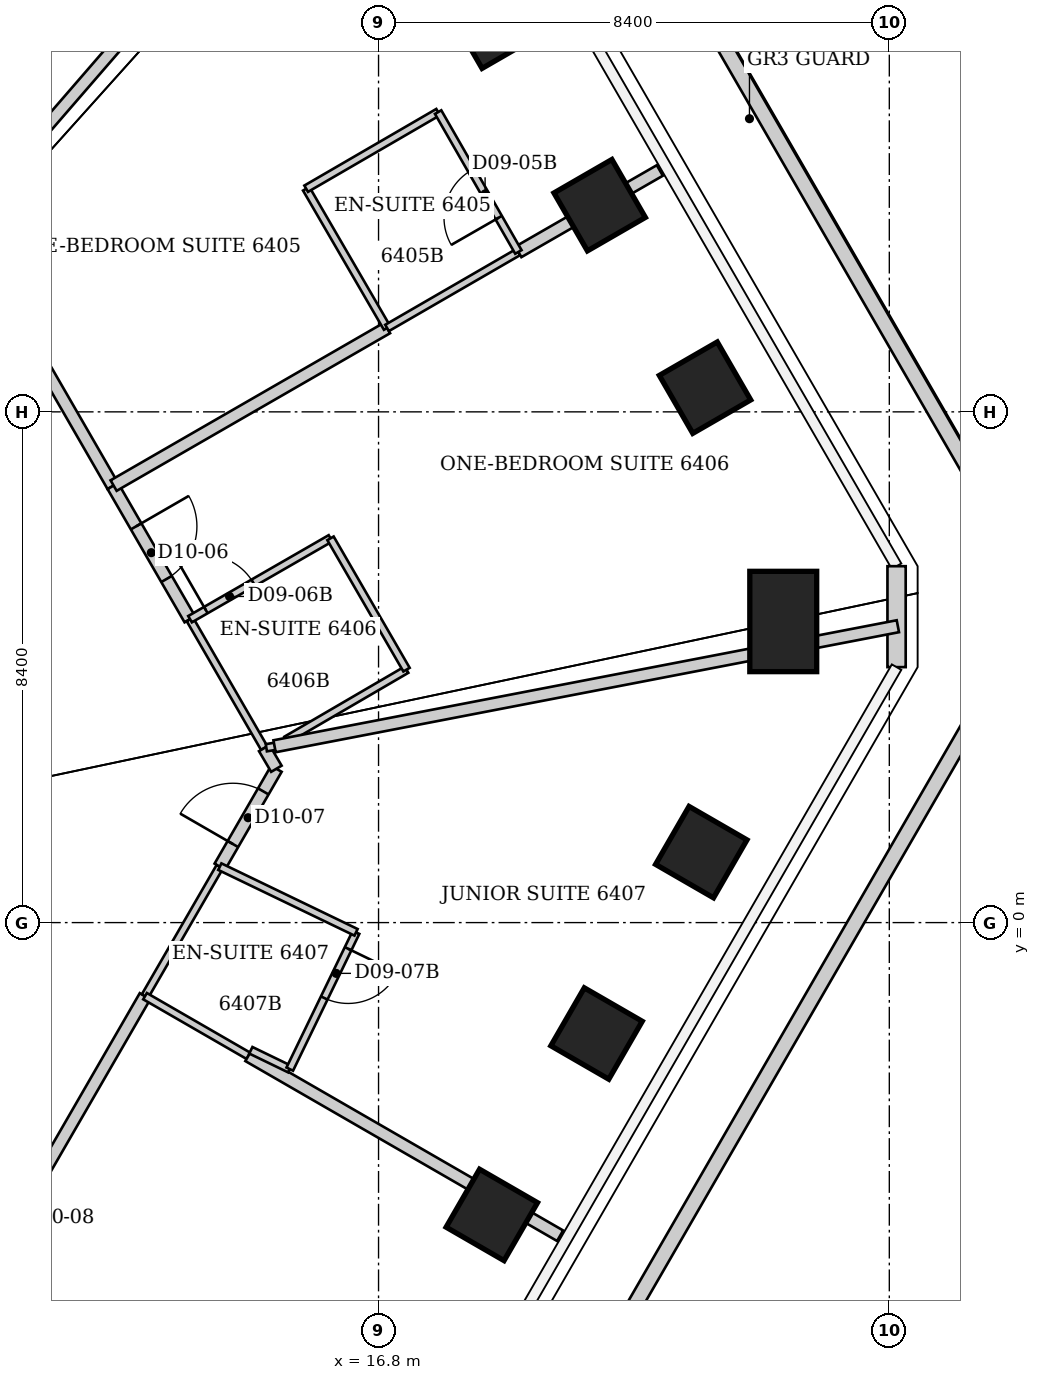
"""IFC4 building model, lengths in metres.
Left out: names, types, materials, properties, quantities, classifications, styles, units other than length and angle.
Written with IfcOpenShell. Run it as: python <this file> out.ifc"""

import sys

from ifc_helpers import new_model, si_unit, direction, frame, frame_2d, origin, origin_2d, place, context, subcontext, project, spatial, rectangle, extrude, clip, halfspace, element, fill, save


model = new_model("IFC4")
c1 = context("Model", 3, precision=1e-05, world=origin(), true_north=direction((0.0, 1.0)))
c2 = subcontext(c1, "Body", "Model", "MODEL_VIEW")
j1 = project(units=[si_unit("LENGTHUNIT", "METRE"), si_unit("PLANEANGLEUNIT", "RADIAN")], contexts=[c1])
p1 = place(None, origin())
s1 = spatial("IfcSite", under=j1, at=p1, CompositionType="ELEMENT")
p2 = place(p1, origin())
s2 = spatial("IfcBuilding", under=s1, at=p2, CompositionType="ELEMENT")
p3 = place(p2, frame((0.0, 0.0, 257.0)))
s3 = spatial("IfcBuildingStorey", under=s2, at=p3, CompositionType="ELEMENT", Elevation=257.0)
p4 = place(p3, frame((18.704, 14.8, -0.059), z_axis=(0.0, 0.0, 1.0), x_axis=(0.866025403784, 0.5, 0.0)))
e1 = element("IfcColumn", 1, at=p4, inside=s3, PredefinedType="COLUMN", context=c2, shape_type="SweptSolid", body=[
    clip(extrude(rectangle(XDim=1.1, YDim=1.1, at=origin_2d()), origin(), (0.0, 0.0, 1.0), 3.859), halfspace(frame((0.0, 0.0, 0.059)), True)),
])
p5 = place(p3, frame((20.437, 11.799, -0.051), z_axis=(0.0, 0.0, 1.0), x_axis=(0.866025403784, 0.5, 0.0)))
e2 = element("IfcColumn", 2, at=p5, inside=s3, PredefinedType="COLUMN", context=c2, shape_type="SweptSolid", body=[
    clip(extrude(rectangle(XDim=1.1, YDim=1.1, at=origin_2d()), origin(), (0.0, 0.0, 1.0), 3.851), halfspace(frame((0.0, 0.0, 0.051)), True)),
])
p6 = place(p3, frame((22.169, 8.798, -0.059), z_axis=(0.0, 0.0, 1.0), x_axis=(0.866025403784, 0.5, 0.0)))
e3 = element("IfcColumn", 3, at=p6, inside=s3, PredefinedType="COLUMN", context=c2, shape_type="SweptSolid", body=[
    clip(extrude(rectangle(XDim=1.1, YDim=1.1, at=origin_2d()), origin(), (0.0, 0.0, 1.0), 3.859), halfspace(frame((0.0, 0.0, 0.059)), True)),
])
p7 = place(p3, frame((23.456, 4.952, -0.069), z_axis=(0.0, 0.0, 1.0), x_axis=(1.0, 0.0, 0.0)))
e4 = element("IfcColumn", 4, at=p7, inside=s3, PredefinedType="COLUMN", context=c2, shape_type="SweptSolid", body=[
    clip(extrude(rectangle(XDim=1.1, YDim=1.65, at=origin_2d()), origin(), (0.0, 0.0, 1.0), 3.869), halfspace(frame((0.0, 0.0, 0.069)), True)),
])
p8 = place(p3, frame((22.108, 1.159, -0.067), z_axis=(0.0, 0.0, 1.0), x_axis=(0.866025403784, -0.5, 0.0)))
e5 = element("IfcColumn", 5, at=p8, inside=s3, PredefinedType="COLUMN", context=c2, shape_type="SweptSolid", body=[
    clip(extrude(rectangle(XDim=1.1, YDim=1.1, at=origin_2d()), origin(), (0.0, 0.0, 1.0), 3.867), halfspace(frame((0.0, 0.0, 0.067)), True)),
])
p9 = place(p3, frame((20.385, -1.824, -0.06), z_axis=(0.0, 0.0, 1.0), x_axis=(0.866025403784, -0.5, 0.0)))
e6 = element("IfcColumn", 6, at=p9, inside=s3, PredefinedType="COLUMN", context=c2, shape_type="SweptSolid", body=[
    clip(extrude(rectangle(XDim=1.1, YDim=1.1, at=origin_2d()), origin(), (0.0, 0.0, 1.0), 3.86), halfspace(frame((0.0, 0.0, 0.06)), True)),
])
p10 = place(p3, frame((18.663, -4.808, -0.052), z_axis=(0.0, 0.0, 1.0), x_axis=(0.866025403784, -0.5, 0.0)))
e7 = element("IfcColumn", 7, at=p10, inside=s3, PredefinedType="COLUMN", context=c2, shape_type="SweptSolid", body=[
    clip(extrude(rectangle(XDim=1.1, YDim=1.1, at=origin_2d()), origin(), (0.0, 0.0, 1.0), 3.852), halfspace(frame((0.0, 0.0, 0.052)), True)),
])
p11 = place(p3, frame((25.319, 5.862, 0.0), z_axis=(0.0, 0.0, 1.0), x_axis=(0.0, -1.0, 0.0)))
e8 = element("IfcWall", 8, at=p11, inside=s3, PredefinedType="SOLIDWALL", context=c2, shape_type="SweptSolid", body=[
    extrude(rectangle(XDim=1.66, YDim=0.3, at=frame_2d((0.83, 0.0))), origin(), (0.0, 0.0, 1.0), 3.64),
])
p12 = place(p3, frame((9.75, -25.8, 0.0), z_axis=(0.0, 0.0, 1.0), x_axis=(0.499998496786, 0.866026271663, 0.0)))
e9 = element("IfcWall", 9, at=p12, inside=s3, PredefinedType="PARAPET", context=c2, shape_type="SweptSolid", body=[
    extrude(rectangle(XDim=34.936, YDim=0.25, at=frame_2d((17.468, 0.0))), origin(), (0.0, 0.0, 1.0), 1.1),
])
p13 = place(p3, frame((27.22, 6.217, 0.0), z_axis=(0.0, 0.0, 1.0), x_axis=(-0.49999647861, 0.86602743685, 0.0)))
e10 = element("IfcWall", 10, at=p13, inside=s3, PredefinedType="PARAPET", context=c2, shape_type="SweptSolid", body=[
    extrude(rectangle(XDim=16.453, YDim=0.25, at=frame_2d((8.226, 0.0))), origin(), (0.0, 0.0, 1.0), 1.1),
])
p14 = place(p3, frame((8.75, -8.5, 0.0), z_axis=(0.0, 0.0, 1.0), x_axis=(0.500093981358, 0.865971136822, 0.0)))
e11 = element("IfcWall", 11, at=p14, inside=s3, PredefinedType="PARTITIONING", context=c2, shape_type="SweptSolid", body=[
    extrude(rectangle(XDim=8.418, YDim=0.2, at=frame_2d((4.209, 0.0))), origin(), (0.0, 0.0, 1.0), 3.64),
])
p15 = place(p14, frame((3.709, 0.0, 0.0)))
e12 = element("IfcOpeningElement", 12, at=p15, cuts=e11, PredefinedType="OPENING", context=c2, shape_type="SweptSolid", body=[
    extrude(rectangle(XDim=1.0, YDim=2.13, at=frame_2d((0.5, 1.065))), frame((0.0, 0.1, 0.0), z_axis=(0.0, -1.0, 0.0), x_axis=(1.0, 0.0, 0.0)), (0.0, 0.0, 1.0), 0.2),
])
p16 = place(p3, frame((11.19, 9.33, 0.0), z_axis=(0.0, 0.0, 1.0), x_axis=(0.499577688184, -0.866269088372, 0.0)))
e13 = element("IfcWall", 13, at=p16, inside=s3, PredefinedType="PARTITIONING", context=c2, shape_type="SweptSolid", body=[
    extrude(rectangle(XDim=2.482, YDim=0.2, at=frame_2d((1.241, 0.0))), origin(), (0.0, 0.0, 1.0), 3.64),
])
p17 = place(p3, frame((12.43, 7.18, 0.0), z_axis=(0.0, 0.0, 1.0), x_axis=(0.500329012441, -0.865835365015, 0.0)))
e14 = element("IfcWall", 14, at=p17, inside=s3, PredefinedType="PARTITIONING", context=c2, shape_type="SweptSolid", body=[
    extrude(rectangle(XDim=2.531, YDim=0.2, at=frame_2d((1.266, 0.0))), origin(), (0.0, 0.0, 1.0), 3.64),
])
p18 = place(p17, frame((0.766, 0.0, 0.0)))
e15 = element("IfcOpeningElement", 15, at=p18, cuts=e14, PredefinedType="OPENING", context=c2, shape_type="SweptSolid", body=[
    extrude(rectangle(XDim=1.0, YDim=2.13, at=frame_2d((0.5, 1.065))), frame((0.0, 0.1, 0.0), z_axis=(0.0, -1.0, 0.0), x_axis=(1.0, 0.0, 0.0)), (0.0, 0.0, 1.0), 0.2),
])
p19 = place(p3, frame((12.443, 7.188, 0.0), z_axis=(0.0, 0.0, 1.0), x_axis=(0.866335108717, 0.499463191241, 0.0)))
e16 = element("IfcWall", 16, at=p19, inside=s3, PredefinedType="PARTITIONING", context=c2, shape_type="SweptSolid", body=[
    extrude(rectangle(XDim=5.191, YDim=0.2, at=frame_2d((2.595, 0.0))), origin(), (0.0, 0.0, 1.0), 2.878),
])
p20 = place(p3, frame((12.959, -1.209, 0.0), z_axis=(0.0, 0.0, 1.0), x_axis=(0.500472725713, 0.865752303385, 0.0)))
e17 = element("IfcWall", 17, at=p20, inside=s3, PredefinedType="PARTITIONING", context=c2, shape_type="SweptSolid", body=[
    extrude(rectangle(XDim=2.459, YDim=0.12, at=frame_2d((1.23, 0.0))), origin(), (0.0, 0.0, 1.0), 3.64),
])
p21 = place(p3, frame((12.96, -1.21, 0.0), z_axis=(0.0, 0.0, 1.0), x_axis=(0.866075784294, -0.499912728242, 0.0)))
e18 = element("IfcWall", 18, at=p21, inside=s3, PredefinedType="PARTITIONING", context=c2, shape_type="SweptSolid", body=[
    extrude(rectangle(XDim=1.962, YDim=0.12, at=frame_2d((0.981, 0.0))), origin(), (0.0, 0.0, 1.0), 3.64),
])
p22 = place(p3, frame((13.697, 4.988, 0.0), z_axis=(0.0, 0.0, 1.0), x_axis=(0.500142899558, -0.865942884965, 0.0)))
e19 = element("IfcWall", 19, at=p22, inside=s3, PredefinedType="PARTITIONING", context=c2, shape_type="SweptSolid", body=[
    extrude(rectangle(XDim=2.446, YDim=0.12, at=frame_2d((1.223, 0.0))), origin(), (0.0, 0.0, 1.0), 3.64),
])
p23 = place(p3, frame((14.19, 0.92, 0.0), z_axis=(0.0, 0.0, 1.0), x_axis=(0.500233848448, 0.865890349217, 0.0)))
e20 = element("IfcWall", 20, at=p23, inside=s3, PredefinedType="PARTITIONING", context=c2, shape_type="SweptSolid", body=[
    extrude(rectangle(XDim=1.859, YDim=0.2, at=frame_2d((0.93, 0.0))), origin(), (0.0, 0.0, 1.0), 3.64),
])
p24 = place(p23, frame((0.43, 0.0, 0.0)))
e21 = element("IfcOpeningElement", 21, at=p24, cuts=e20, PredefinedType="OPENING", context=c2, shape_type="SweptSolid", body=[
    extrude(rectangle(XDim=1.0, YDim=2.13, at=frame_2d((0.5, 1.065))), frame((0.0, 0.1, 0.0), z_axis=(0.0, -1.0, 0.0), x_axis=(1.0, 0.0, 0.0)), (0.0, 0.0, 1.0), 0.2),
])
p25 = place(p3, frame((14.659, -2.191, 0.0), z_axis=(0.0, 0.0, 1.0), x_axis=(0.866075017274, -0.499914057068, 0.0)))
e22 = element("IfcWall", 22, at=p25, inside=s3, PredefinedType="PARTITIONING", context=c2, shape_type="SweptSolid", body=[
    extrude(rectangle(XDim=5.919, YDim=0.2, at=frame_2d((2.96, 0.0))), origin(), (0.0, 0.0, 1.0), 3.64),
])
p26 = place(p3, frame((14.7, -2.1, 0.0), z_axis=(0.0, 0.0, 1.0), x_axis=(0.900120171182, -0.43564168468, 0.0)))
e23 = element("IfcWall", 23, at=p26, inside=s3, PredefinedType="PARTITIONING", context=c2, shape_type="SweptSolid", body=[
    extrude(rectangle(XDim=0.711, YDim=0.12, at=frame_2d((0.355, 0.0))), origin(), (0.0, 0.0, 1.0), 3.64),
])
p27 = place(p3, frame((14.92, 2.87, 0.0), z_axis=(0.0, 0.0, 1.0), x_axis=(0.507290461451, -0.861775137562, 0.0)))
e24 = element("IfcWall", 24, at=p27, inside=s3, PredefinedType="PARTITIONING", context=c2, shape_type="SweptSolid", body=[
    extrude(rectangle(XDim=0.395, YDim=0.2, at=frame_2d((0.197, 0.0))), origin(), (0.0, 0.0, 1.0), 3.64),
])
p28 = place(p3, frame((14.955, 2.876, 0.0), z_axis=(0.0, 0.0, 1.0), x_axis=(0.986483246584, 0.16386215002, 0.0)))
e25 = element("IfcWall", 25, at=p28, inside=s3, PredefinedType="PARTITIONING", context=c2, shape_type="SweptSolid", body=[
    extrude(rectangle(XDim=0.147, YDim=0.12, at=frame_2d((0.074, 0.0))), origin(), (0.0, 0.0, 1.0), 3.64),
])
p29 = place(p3, frame((15.281, 3.006, 0.0), z_axis=(0.0, 0.0, 1.0), x_axis=(0.863794364129, 0.503844516194, 0.0)))
e26 = element("IfcWall", 26, at=p29, inside=s3, PredefinedType="PARTITIONING", context=c2, shape_type="SweptSolid", body=[
    extrude(rectangle(XDim=2.291, YDim=0.12, at=frame_2d((1.145, 0.0))), origin(), (0.0, 0.0, 1.0), 3.64),
])
p30 = place(p3, frame((15.34, -2.41, 0.0), z_axis=(0.0, 0.0, 1.0), x_axis=(0.435928453727, 0.899981323824, 0.0)))
e27 = element("IfcWall", 27, at=p30, inside=s3, PredefinedType="PARTITIONING", context=c2, shape_type="SweptSolid", body=[
    extrude(rectangle(XDim=2.5, YDim=0.12, at=frame_2d((1.25, 0.0))), origin(), (0.0, 0.0, 1.0), 3.64),
])
p31 = place(p30, frame((1.3, 0.0, 0.0)))
e28 = element("IfcOpeningElement", 28, at=p31, cuts=e27, PredefinedType="OPENING", context=c2, shape_type="SweptSolid", body=[
    extrude(rectangle(XDim=0.9, YDim=2.03, at=frame_2d((0.45, 1.015))), frame((0.0, 0.06, 0.0), z_axis=(0.0, -1.0, 0.0), x_axis=(1.0, 0.0, 0.0)), (0.0, 0.0, 1.0), 0.12),
])
p32 = place(p3, frame((15.61, 12.07, 0.0), z_axis=(0.0, 0.0, 1.0), x_axis=(0.502173326652, -0.864766991738, 0.0)))
e29 = element("IfcWall", 29, at=p32, inside=s3, PredefinedType="PARTITIONING", context=c2, shape_type="SweptSolid", body=[
    extrude(rectangle(XDim=2.648, YDim=0.12, at=frame_2d((1.324, 0.0))), origin(), (0.0, 0.0, 1.0), 3.64),
])
p33 = place(p3, frame((16.01, 6.32, 0.0), z_axis=(0.0, 0.0, 1.0), x_axis=(-0.866615255992, -0.498976951453, 0.0)))
e30 = element("IfcWall", 30, at=p33, inside=s3, PredefinedType="PARTITIONING", context=c2, shape_type="SweptSolid", body=[
    extrude(rectangle(XDim=2.666, YDim=0.12, at=frame_2d((1.333, 0.0))), origin(), (0.0, 0.0, 1.0), 3.64),
])
p34 = place(p33, frame((1.466, 0.0, 0.0)))
e31 = element("IfcOpeningElement", 31, at=p34, cuts=e30, PredefinedType="OPENING", context=c2, shape_type="SweptSolid", body=[
    extrude(rectangle(XDim=0.9, YDim=2.03, at=frame_2d((0.45, 1.015))), frame((0.0, 0.06, 0.0), z_axis=(0.0, -1.0, 0.0), x_axis=(1.0, 0.0, 0.0)), (0.0, 0.0, 1.0), 0.12),
])
p35 = place(p3, frame((16.43, -0.16, 0.0), z_axis=(0.0, 0.0, 1.0), x_axis=(-0.900794056548, 0.434246551729, 0.0)))
e32 = element("IfcWall", 32, at=p35, inside=s3, PredefinedType="PARTITIONING", context=c2, shape_type="SweptSolid", body=[
    extrude(rectangle(XDim=2.487, YDim=0.12, at=frame_2d((1.243, 0.0))), origin(), (0.0, 0.0, 1.0), 3.64),
])
p36 = place(p3, frame((16.89, 19.507, 0.0), z_axis=(0.0, 0.0, 1.0), x_axis=(-0.654509091565, -0.756054131037, 0.0)))
e33 = element("IfcWall", 33, at=p36, inside=s3, PredefinedType="PARTITIONING", context=c2, shape_type="SweptSolid", body=[
    extrude(rectangle(XDim=13.346, YDim=0.2, at=frame_2d((6.673, 0.0))), origin(), (0.0, 0.0, 1.0), 3.64),
])
p37 = place(p3, frame((16.94, 9.78, 0.0), z_axis=(0.0, 0.0, 1.0), x_axis=(0.865533423938, 0.500851167559, 0.0)))
e34 = element("IfcWall", 34, at=p37, inside=s3, PredefinedType="PARTITIONING", context=c2, shape_type="SweptSolid", body=[
    extrude(rectangle(XDim=2.496, YDim=0.12, at=frame_2d((1.248, 0.0))), origin(), (0.0, 0.0, 1.0), 2.878),
])
p38 = place(p3, frame((17.26, 4.16, 0.0), z_axis=(0.0, 0.0, 1.0), x_axis=(-0.500851167559, 0.865533423938, 0.0)))
e35 = element("IfcWall", 35, at=p38, inside=s3, PredefinedType="PARTITIONING", context=c2, shape_type="SweptSolid", body=[
    extrude(rectangle(XDim=2.496, YDim=0.12, at=frame_2d((1.248, 0.0))), origin(), (0.0, 0.0, 1.0), 3.64),
])
p39 = place(p3, frame((17.78, 13.33, 0.0), z_axis=(0.0, 0.0, 1.0), x_axis=(-0.864803937094, -0.502109699555, 0.0)))
e36 = element("IfcWall", 36, at=p39, inside=s3, PredefinedType="PARTITIONING", context=c2, shape_type="SweptSolid", body=[
    extrude(rectangle(XDim=2.51, YDim=0.12, at=frame_2d((1.255, 0.0))), origin(), (0.0, 0.0, 1.0), 3.64),
])
p40 = place(p3, frame((19.099, 11.031, 0.0), z_axis=(0.0, 0.0, 1.0), x_axis=(0.866739223556, 0.498761584678, 0.0)))
e37 = element("IfcWall", 37, at=p40, inside=s3, PredefinedType="PARTITIONING", context=c2, shape_type="SweptSolid", body=[
    extrude(rectangle(XDim=2.684, YDim=0.2, at=frame_2d((1.342, 0.0))), origin(), (0.0, 0.0, 1.0), 2.878),
])
p41 = place(p3, frame((19.1, 11.03, 0.0), z_axis=(0.0, 0.0, 1.0), x_axis=(-0.497773911185, 0.867306827682, 0.0)))
e38 = element("IfcWall", 38, at=p41, inside=s3, PredefinedType="PARTITIONING", context=c2, shape_type="SweptSolid", body=[
    extrude(rectangle(XDim=2.652, YDim=0.12, at=frame_2d((1.326, 0.0))), origin(), (0.0, 0.0, 1.0), 3.64),
])
p42 = place(p41, frame((0.65, 0.0, 0.0)))
e39 = element("IfcOpeningElement", 39, at=p42, cuts=e38, PredefinedType="OPENING", context=c2, shape_type="SweptSolid", body=[
    extrude(rectangle(XDim=0.9, YDim=2.03, at=frame_2d((0.45, 1.015))), frame((0.0, 0.06, 0.0), z_axis=(0.0, -1.0, 0.0), x_axis=(1.0, 0.0, 0.0)), (0.0, 0.0, 1.0), 0.12),
])
p43 = place(p3, frame((25.341, 4.874, 0.0), z_axis=(0.0, 0.0, 1.0), x_axis=(-0.981951021889, -0.189135376412, 0.0)))
e40 = element("IfcWall", 40, at=p43, inside=s3, PredefinedType="PARTITIONING", context=c2, shape_type="SweptSolid", body=[
    extrude(rectangle(XDim=10.439, YDim=0.2, at=frame_2d((5.219, 0.0))), origin(), (0.0, 0.0, 1.0), 3.64),
])
p44 = place(p42, origin())
e41 = element("IfcDoor", 41, at=p44, inside=s3, OperationType="SINGLE_SWING_LEFT", PredefinedType="DOOR", context=c2, shape_type="SweptSolid", body=[
    extrude(rectangle(XDim=0.9, YDim=2.03, at=frame_2d((0.45, 1.015))), frame((0.0, 0.025, 0.0), z_axis=(0.0, -1.0, 0.0), x_axis=(1.0, 0.0, 0.0)), (0.0, 0.0, 1.0), 0.05),
])
fill(e39, e41)
p45 = place(p18, origin())
e42 = element("IfcDoor", 42, at=p45, inside=s3, OperationType="SINGLE_SWING_LEFT", PredefinedType="DOOR", context=c2, shape_type="SweptSolid", body=[
    extrude(rectangle(XDim=1.0, YDim=2.13, at=frame_2d((0.5, 1.065))), frame((0.0, 0.025, 0.0), z_axis=(0.0, -1.0, 0.0), x_axis=(1.0, 0.0, 0.0)), (0.0, 0.0, 1.0), 0.05),
])
fill(e15, e42)
p46 = place(p34, origin())
e43 = element("IfcDoor", 43, at=p46, inside=s3, OperationType="SINGLE_SWING_RIGHT", PredefinedType="DOOR", context=c2, shape_type="SweptSolid", body=[
    extrude(rectangle(XDim=0.9, YDim=2.03, at=frame_2d((0.45, 1.015))), frame((0.0, 0.025, 0.0), z_axis=(0.0, -1.0, 0.0), x_axis=(1.0, 0.0, 0.0)), (0.0, 0.0, 1.0), 0.05),
])
fill(e31, e43)
p47 = place(p24, origin())
e44 = element("IfcDoor", 44, at=p47, inside=s3, OperationType="SINGLE_SWING_LEFT", PredefinedType="DOOR", context=c2, shape_type="SweptSolid", body=[
    extrude(rectangle(XDim=1.0, YDim=2.13, at=frame_2d((0.5, 1.065))), frame((0.0, 0.025, 0.0), z_axis=(0.0, -1.0, 0.0), x_axis=(1.0, 0.0, 0.0)), (0.0, 0.0, 1.0), 0.05),
])
fill(e21, e44)
p48 = place(p31, origin())
e45 = element("IfcDoor", 45, at=p48, inside=s3, OperationType="SINGLE_SWING_RIGHT", PredefinedType="DOOR", context=c2, shape_type="SweptSolid", body=[
    extrude(rectangle(XDim=0.9, YDim=2.03, at=frame_2d((0.45, 1.015))), frame((0.0, 0.025, 0.0), z_axis=(0.0, -1.0, 0.0), x_axis=(1.0, 0.0, 0.0)), (0.0, 0.0, 1.0), 0.05),
])
fill(e28, e45)
save(model, sys.argv[1])
